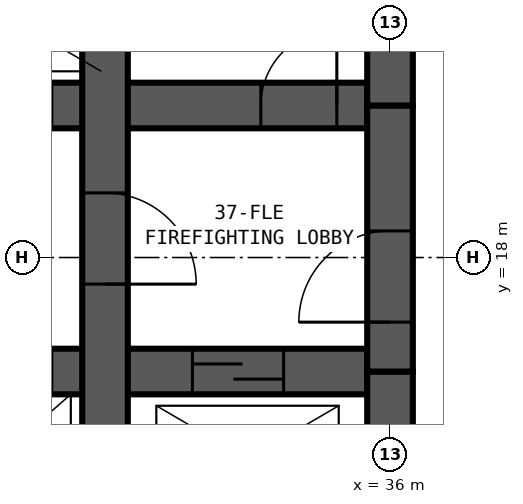
"""IFC4 building model, lengths in metres.
Left out: names, types, materials, properties, quantities, classifications, styles, units other than length and angle.
Written with IfcOpenShell. Run it as: python <this file> out.ifc"""

import sys

from ifc_helpers import new_model, si_unit, direction, frame, frame_2d, origin, place, context, subcontext, project, spatial, rectangle, extrude, element, fill, save


model = new_model("IFC4")
c1 = context("Model", 3, precision=1e-05, world=origin(), true_north=direction((0.0, 1.0)))
c2 = subcontext(c1, "Body", "Model", "MODEL_VIEW")
j1 = project(units=[si_unit("LENGTHUNIT", "METRE"), si_unit("PLANEANGLEUNIT", "RADIAN")], contexts=[c1])
p1 = place(None, origin())
s1 = spatial("IfcSite", under=j1, at=p1, CompositionType="ELEMENT")
p2 = place(p1, origin())
s2 = spatial("IfcBuilding", under=s1, at=p2, CompositionType="ELEMENT")
p3 = place(p2, frame((0.0, 0.0, 142.4)))
s3 = spatial("IfcBuildingStorey", under=s2, at=p3, CompositionType="ELEMENT", Elevation=142.4)
p4 = place(p3, frame((32.25, 13.8, 0.0), z_axis=(0.0, 0.0, 1.0), x_axis=(0.0, 1.0, 0.0)))
e1 = element("IfcWall", 1, at=p4, inside=s3, PredefinedType="SHEAR", context=c2, shape_type="SweptSolid", body=[
    extrude(rectangle(XDim=12.9, YDim=0.6, at=frame_2d((6.45, 0.0))), origin(), (0.0, 0.0, 1.0), 3.5),
])
p5 = place(p4, frame((5.05, 0.0, 0.0), z_axis=(0.0, 0.0, 1.0), x_axis=(-1.0, 0.0, 0.0)))
e2 = element("IfcOpeningElement", 2, at=p5, cuts=e1, PredefinedType="OPENING", context=c2, shape_type="SweptSolid", body=[
    extrude(rectangle(XDim=1.2, YDim=2.1, at=frame_2d((0.6, 1.05))), frame((0.0, 0.31, 0.0), z_axis=(0.0, -1.0, 0.0), x_axis=(1.0, 0.0, 0.0)), (0.0, 0.0, 1.0), 0.62),
])
p6 = place(p3, frame((13.8, 16.5, 0.0), z_axis=(0.0, 0.0, 1.0), x_axis=(1.0, 0.0, 0.0)))
e3 = element("IfcWall", 3, at=p6, inside=s3, PredefinedType="SHEAR", context=c2, shape_type="SweptSolid", body=[
    extrude(rectangle(XDim=21.9, YDim=0.6, at=frame_2d((10.95, 0.0))), origin(), (0.0, 0.0, 1.0), 3.5),
])
p7 = place(p6, frame((11.65, 0.0, 0.0)))
e4 = element("IfcOpeningElement", 4, at=p7, cuts=e3, PredefinedType="OPENING", context=c2, shape_type="SweptSolid", body=[
    extrude(rectangle(XDim=1.1, YDim=2.1, at=frame_2d((0.55, 1.05))), frame((0.0, 0.31, 0.0), z_axis=(0.0, -1.0, 0.0), x_axis=(1.0, 0.0, 0.0)), (0.0, 0.0, 1.0), 0.62),
])
p8 = place(p6, frame((14.15, 0.0, 0.0)))
e5 = element("IfcOpeningElement", 5, at=p8, cuts=e3, PredefinedType="OPENING", context=c2, shape_type="SweptSolid", body=[
    extrude(rectangle(XDim=1.1, YDim=2.1, at=frame_2d((0.55, 1.05))), frame((0.0, 0.31, 0.0), z_axis=(0.0, -1.0, 0.0), x_axis=(1.0, 0.0, 0.0)), (0.0, 0.0, 1.0), 0.62),
])
p9 = place(p6, frame((16.65, 0.0, 0.0)))
e6 = element("IfcOpeningElement", 6, at=p9, cuts=e3, PredefinedType="OPENING", context=c2, shape_type="SweptSolid", body=[
    extrude(rectangle(XDim=1.1, YDim=2.1, at=frame_2d((0.55, 1.05))), frame((0.0, 0.31, 0.0), z_axis=(0.0, -1.0, 0.0), x_axis=(1.0, 0.0, 0.0)), (0.0, 0.0, 1.0), 0.62),
])
p10 = place(p6, frame((5.75, 0.0, 0.0), z_axis=(0.0, 0.0, 1.0), x_axis=(-1.0, 0.0, 0.0)))
e7 = element("IfcOpeningElement", 7, at=p10, cuts=e3, PredefinedType="OPENING", context=c2, shape_type="SweptSolid", body=[
    extrude(rectangle(XDim=1.0, YDim=2.1, at=frame_2d((0.5, 1.05))), frame((0.0, 0.31, 0.0), z_axis=(0.0, -1.0, 0.0), x_axis=(1.0, 0.0, 0.0)), (0.0, 0.0, 1.0), 0.62),
])
p11 = place(p6, frame((10.2, 0.0, 0.0), z_axis=(0.0, 0.0, 1.0), x_axis=(-1.0, 0.0, 0.0)))
e8 = element("IfcOpeningElement", 8, at=p11, cuts=e3, PredefinedType="OPENING", context=c2, shape_type="SweptSolid", body=[
    extrude(rectangle(XDim=1.0, YDim=2.1, at=frame_2d((0.5, 1.05))), frame((0.0, 0.31, 0.0), z_axis=(0.0, -1.0, 0.0), x_axis=(1.0, 0.0, 0.0)), (0.0, 0.0, 1.0), 0.62),
])
p12 = place(p6, frame((0.6, 0.0, 0.0)))
e9 = element("IfcOpeningElement", 9, at=p12, cuts=e3, PredefinedType="OPENING", context=c2, shape_type="SweptSolid", body=[
    extrude(rectangle(XDim=1.2, YDim=2.1, at=frame_2d((0.6, 1.05))), frame((0.0, 0.31, 0.0), z_axis=(0.0, -1.0, 0.0), x_axis=(1.0, 0.0, 0.0)), (0.0, 0.0, 1.0), 0.62),
])
p13 = place(p6, frame((19.6, 0.0, 0.0)))
e10 = element("IfcOpeningElement", 10, at=p13, cuts=e3, PredefinedType="OPENING", context=c2, shape_type="SweptSolid", body=[
    extrude(rectangle(XDim=1.2, YDim=2.1, at=frame_2d((0.6, 1.05))), frame((0.0, 0.31, 0.0), z_axis=(0.0, -1.0, 0.0), x_axis=(1.0, 0.0, 0.0)), (0.0, 0.0, 1.0), 0.62),
])
p14 = place(p3, frame((13.8, 20.0, 0.0), z_axis=(0.0, 0.0, 1.0), x_axis=(1.0, 0.0, 0.0)))
e11 = element("IfcWall", 11, at=p14, inside=s3, PredefinedType="SHEAR", context=c2, shape_type="SweptSolid", body=[
    extrude(rectangle(XDim=21.9, YDim=0.6, at=frame_2d((10.95, 0.0))), origin(), (0.0, 0.0, 1.0), 3.5),
])
p15 = place(p14, frame((0.5, 0.0, 0.0)))
e12 = element("IfcOpeningElement", 12, at=p15, cuts=e11, PredefinedType="OPENING", context=c2, shape_type="SweptSolid", body=[
    extrude(rectangle(XDim=1.0, YDim=2.1, at=frame_2d((0.5, 1.05))), frame((0.0, 0.31, 0.0), z_axis=(0.0, -1.0, 0.0), x_axis=(1.0, 0.0, 0.0)), (0.0, 0.0, 1.0), 0.62),
])
p16 = place(p14, frame((20.5, 0.0, 0.0)))
e13 = element("IfcOpeningElement", 13, at=p16, cuts=e11, PredefinedType="OPENING", context=c2, shape_type="SweptSolid", body=[
    extrude(rectangle(XDim=1.0, YDim=2.1, at=frame_2d((0.5, 1.05))), frame((0.0, 0.31, 0.0), z_axis=(0.0, -1.0, 0.0), x_axis=(1.0, 0.0, 0.0)), (0.0, 0.0, 1.0), 0.62),
])
p17 = place(p14, frame((16.65, 0.0, 0.0)))
e14 = element("IfcOpeningElement", 14, at=p17, cuts=e11, PredefinedType="OPENING", context=c2, shape_type="SweptSolid", body=[
    extrude(rectangle(XDim=1.1, YDim=2.1, at=frame_2d((0.55, 1.05))), frame((0.0, 0.31, 0.0), z_axis=(0.0, -1.0, 0.0), x_axis=(1.0, 0.0, 0.0)), (0.0, 0.0, 1.0), 0.62),
])
p18 = place(p3, frame((36.0, 13.8, 0.0), z_axis=(0.0, 0.0, 1.0), x_axis=(0.0, 1.0, 0.0)))
e15 = element("IfcWall", 15, at=p18, inside=s3, PredefinedType="SHEAR", context=c2, shape_type="SweptSolid", body=[
    extrude(rectangle(XDim=2.7, YDim=0.6, at=frame_2d((1.35, 0.0))), origin(), (0.0, 0.0, 1.0), 3.5),
])
p19 = place(p3, frame((36.0, 16.5, 0.0), z_axis=(0.0, 0.0, 1.0), x_axis=(0.0, 1.0, 0.0)))
e16 = element("IfcWall", 16, at=p19, inside=s3, PredefinedType="SHEAR", context=c2, shape_type="SweptSolid", body=[
    extrude(rectangle(XDim=3.5, YDim=0.6, at=frame_2d((1.75, 0.0))), origin(), (0.0, 0.0, 1.0), 3.5),
])
p20 = place(p19, frame((0.65, 0.0, 0.0)))
e17 = element("IfcOpeningElement", 17, at=p20, cuts=e16, PredefinedType="OPENING", context=c2, shape_type="SweptSolid", body=[
    extrude(rectangle(XDim=1.2, YDim=2.1, at=frame_2d((0.6, 1.05))), frame((0.0, 0.31, 0.0), z_axis=(0.0, -1.0, 0.0), x_axis=(1.0, 0.0, 0.0)), (0.0, 0.0, 1.0), 0.62),
])
p21 = place(p3, frame((36.0, 20.0, 0.0), z_axis=(0.0, 0.0, 1.0), x_axis=(0.0, 1.0, 0.0)))
e18 = element("IfcWall", 18, at=p21, inside=s3, PredefinedType="SHEAR", context=c2, shape_type="SweptSolid", body=[
    extrude(rectangle(XDim=6.7, YDim=0.6, at=frame_2d((3.35, 0.0))), origin(), (0.0, 0.0, 1.0), 3.5),
])
p22 = place(p20, origin())
e19 = element("IfcDoor", 19, at=p22, inside=s3, OperationType="SINGLE_SWING_LEFT", PredefinedType="DOOR", context=c2, shape_type="SweptSolid", body=[
    extrude(rectangle(XDim=1.2, YDim=2.1, at=frame_2d((0.6, 1.05))), frame((0.0, 0.3, 0.0), z_axis=(0.0, -1.0, 0.0), x_axis=(1.0, 0.0, 0.0)), (0.0, 0.0, 1.0), 0.6),
])
fill(e17, e19)
p23 = place(p5, origin())
e20 = element("IfcDoor", 20, at=p23, inside=s3, OperationType="SINGLE_SWING_RIGHT", PredefinedType="DOOR", context=c2, shape_type="SweptSolid", body=[
    extrude(rectangle(XDim=1.2, YDim=2.1, at=frame_2d((0.6, 1.05))), frame((0.0, 0.3, 0.0), z_axis=(0.0, -1.0, 0.0), x_axis=(1.0, 0.0, 0.0)), (0.0, 0.0, 1.0), 0.6),
])
fill(e2, e20)
p24 = place(p16, origin())
e21 = element("IfcDoor", 21, at=p24, inside=s3, OperationType="SINGLE_SWING_RIGHT", PredefinedType="DOOR", context=c2, shape_type="SweptSolid", body=[
    extrude(rectangle(XDim=1.0, YDim=2.1, at=frame_2d((0.5, 1.05))), frame((0.0, 0.3, 0.0), z_axis=(0.0, -1.0, 0.0), x_axis=(1.0, 0.0, 0.0)), (0.0, 0.0, 1.0), 0.6),
])
fill(e13, e21)
p25 = place(p13, origin())
e22 = element("IfcDoor", 22, at=p25, inside=s3, OperationType="SLIDING_TO_LEFT", PredefinedType="DOOR", context=c2, shape_type="SweptSolid", body=[
    extrude(rectangle(XDim=1.2, YDim=2.1, at=frame_2d((0.6, 1.05))), frame((0.0, 0.3, 0.0), z_axis=(0.0, -1.0, 0.0), x_axis=(1.0, 0.0, 0.0)), (0.0, 0.0, 1.0), 0.6),
])
fill(e10, e22)
save(model, sys.argv[1])
